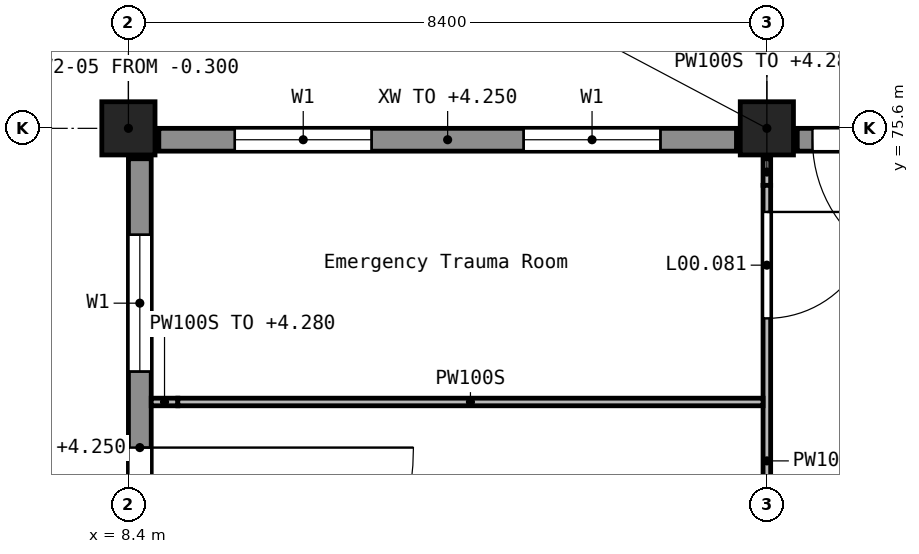
"""IFC4 building model, lengths in metres.
Left out: names, types, materials, properties, quantities, classifications, styles, units other than length and angle.
Written with IfcOpenShell. Run it as: python <this file> out.ifc"""

import sys

from ifc_helpers import new_model, si_unit, direction, frame, frame_2d, origin, origin_2d, place, context, subcontext, project, spatial, rectangle, extrude, element, fill, save


model = new_model("IFC4")
c1 = context("Model", 3, precision=1e-05, world=origin(), true_north=direction((0.0, 1.0)))
c2 = subcontext(c1, "Body", "Model", "MODEL_VIEW")
j1 = project(units=[si_unit("LENGTHUNIT", "METRE"), si_unit("PLANEANGLEUNIT", "RADIAN")], contexts=[c1])
p1 = place(None, origin())
s1 = spatial("IfcSite", under=j1, at=p1, CompositionType="ELEMENT")
p2 = place(p1, origin())
s2 = spatial("IfcBuilding", under=s1, at=p2, CompositionType="ELEMENT")
p3 = place(p2, origin())
s3 = spatial("IfcBuildingStorey", under=s2, at=p3, CompositionType="ELEMENT", Elevation=0.0)
for number, where, z_axis, x_axis in (
    (1, (8.4, 75.6, -0.3), (0.0, 0.0, 1.0), (1.0, 0.0, 0.0)),
    (2, (16.8, 75.6, -0.3), (0.0, 0.0, 1.0), (1.0, 0.0, 0.0)),
):
    element("IfcColumn", number, at=place(p3, frame(where, z_axis=z_axis, x_axis=x_axis)), inside=s3, PredefinedType="COLUMN", context=c2, shape_type="SweptSolid", body=[
        extrude(rectangle(XDim=0.7, YDim=0.7, at=origin_2d()), origin(), (0.0, 0.0, 1.0), 5.7),
    ])
p4 = place(p3, frame((24.8, 75.45, 0.0), z_axis=(0.0, 0.0, 1.0), x_axis=(-1.0, 0.0, 0.0)))
e3 = element("IfcWall", 3, at=p4, inside=s3, PredefinedType="STANDARD", context=c2, shape_type="SweptSolid", body=[
    extrude(rectangle(XDim=7.6, YDim=0.3, at=frame_2d((3.8, 0.0))), origin(), (0.0, 0.0, 1.0), 4.25),
])
p5 = place(p4, frame((5.6, 0.0, 0.0)))
e4 = element("IfcOpeningElement", 4, at=p5, cuts=e3, PredefinedType="OPENING", context=c2, shape_type="SweptSolid", body=[
    extrude(rectangle(XDim=1.8, YDim=2.1, at=frame_2d((0.9, 1.05))), frame((0.0, 0.16, 0.0), z_axis=(0.0, -1.0, 0.0), x_axis=(1.0, 0.0, 0.0)), (0.0, 0.0, 1.0), 0.32),
])
p6 = place(p4, frame((1.0, 0.0, 0.9)))
e5 = element("IfcOpeningElement", 5, at=p6, cuts=e3, PredefinedType="OPENING", context=c2, shape_type="SweptSolid", body=[
    extrude(rectangle(XDim=1.8, YDim=1.5, at=frame_2d((0.9, 0.75))), frame((0.0, 0.16, 0.0), z_axis=(0.0, -1.0, 0.0), x_axis=(1.0, 0.0, 0.0)), (0.0, 0.0, 1.0), 0.32),
])
p7 = place(p3, frame((16.4, 75.45, 0.0), z_axis=(0.0, 0.0, 1.0), x_axis=(-1.0, 0.0, 0.0)))
e6 = element("IfcWall", 6, at=p7, inside=s3, PredefinedType="STANDARD", context=c2, shape_type="SweptSolid", body=[
    extrude(rectangle(XDim=7.6, YDim=0.3, at=frame_2d((3.8, 0.0))), origin(), (0.0, 0.0, 1.0), 4.25),
])
p8 = place(p7, frame((1.0, 0.0, 0.9)))
e7 = element("IfcOpeningElement", 7, at=p8, cuts=e6, PredefinedType="OPENING", context=c2, shape_type="SweptSolid", body=[
    extrude(rectangle(XDim=1.8, YDim=1.5, at=frame_2d((0.9, 0.75))), frame((0.0, 0.16, 0.0), z_axis=(0.0, -1.0, 0.0), x_axis=(1.0, 0.0, 0.0)), (0.0, 0.0, 1.0), 0.32),
])
p9 = place(p7, frame((4.8, 0.0, 0.9)))
e8 = element("IfcOpeningElement", 8, at=p9, cuts=e6, PredefinedType="OPENING", context=c2, shape_type="SweptSolid", body=[
    extrude(rectangle(XDim=1.8, YDim=1.5, at=frame_2d((0.9, 0.75))), frame((0.0, 0.16, 0.0), z_axis=(0.0, -1.0, 0.0), x_axis=(1.0, 0.0, 0.0)), (0.0, 0.0, 1.0), 0.32),
])
p10 = place(p3, frame((8.55, 75.2, 0.0), z_axis=(0.0, 0.0, 1.0), x_axis=(0.0, -1.0, 0.0)))
e9 = element("IfcWall", 9, at=p10, inside=s3, PredefinedType="STANDARD", context=c2, shape_type="SweptSolid", body=[
    extrude(rectangle(XDim=7.6, YDim=0.3, at=frame_2d((3.8, 0.0))), origin(), (0.0, 0.0, 1.0), 4.25),
])
p11 = place(p10, frame((3.8, 0.0, 0.0)))
e10 = element("IfcOpeningElement", 10, at=p11, cuts=e9, PredefinedType="OPENING", context=c2, shape_type="SweptSolid", body=[
    extrude(rectangle(XDim=3.6, YDim=2.4, at=frame_2d((1.8, 1.2))), frame((0.0, 0.16, 0.0), z_axis=(0.0, -1.0, 0.0), x_axis=(1.0, 0.0, 0.0)), (0.0, 0.0, 1.0), 0.32),
])
p12 = place(p10, frame((1.0, 0.0, 0.9)))
e11 = element("IfcOpeningElement", 11, at=p12, cuts=e9, PredefinedType="OPENING", context=c2, shape_type="SweptSolid", body=[
    extrude(rectangle(XDim=1.8, YDim=1.5, at=frame_2d((0.9, 0.75))), frame((0.0, 0.16, 0.0), z_axis=(0.0, -1.0, 0.0), x_axis=(1.0, 0.0, 0.0)), (0.0, 0.0, 1.0), 0.32),
])
p13 = place(p3, frame((16.8, 75.2, 0.0), z_axis=(0.0, 0.0, 1.0), x_axis=(0.0, -1.0, 0.0)))
e12 = element("IfcWall", 12, at=p13, inside=s3, PredefinedType="PARTITIONING", context=c2, shape_type="SweptSolid", body=[
    extrude(rectangle(XDim=0.35, YDim=0.1, at=frame_2d((0.175, 0.0))), origin(), (0.0, 0.0, 1.0), 4.28),
])
p14 = place(p3, frame((16.8, 74.85, 0.0), z_axis=(0.0, 0.0, 1.0), x_axis=(0.0, -1.0, 0.0)))
e13 = element("IfcWall", 13, at=p14, inside=s3, PredefinedType="PARTITIONING", context=c2, shape_type="SweptSolid", body=[
    extrude(rectangle(XDim=7.25, YDim=0.1, at=frame_2d((3.625, 0.0))), origin(), (0.0, 0.0, 1.0), 5.05),
])
p15 = place(p14, frame((4.55, 0.0, 0.0)))
e14 = element("IfcOpeningElement", 14, at=p15, cuts=e13, PredefinedType="OPENING", context=c2, shape_type="SweptSolid", body=[
    extrude(rectangle(XDim=1.4, YDim=2.1, at=frame_2d((0.7, 1.05))), frame((0.0, 0.06, 0.0), z_axis=(0.0, -1.0, 0.0), x_axis=(1.0, 0.0, 0.0)), (0.0, 0.0, 1.0), 0.12),
])
p16 = place(p14, frame((0.35, 0.0, 0.0)))
e15 = element("IfcOpeningElement", 15, at=p16, cuts=e13, PredefinedType="OPENING", context=c2, shape_type="SweptSolid", body=[
    extrude(rectangle(XDim=1.4, YDim=2.1, at=frame_2d((0.7, 1.05))), frame((0.0, 0.06, 0.0), z_axis=(0.0, -1.0, 0.0), x_axis=(1.0, 0.0, 0.0)), (0.0, 0.0, 1.0), 0.12),
])
p17 = place(p3, frame((8.7, 72.0, 0.0), z_axis=(0.0, 0.0, 1.0), x_axis=(1.0, 0.0, 0.0)))
e16 = element("IfcWall", 16, at=p17, inside=s3, PredefinedType="PARTITIONING", context=c2, shape_type="SweptSolid", body=[
    extrude(rectangle(XDim=0.35, YDim=0.1, at=frame_2d((0.175, 0.0))), origin(), (0.0, 0.0, 1.0), 4.28),
])
p18 = place(p3, frame((9.05, 72.0, 0.0), z_axis=(0.0, 0.0, 1.0), x_axis=(1.0, 0.0, 0.0)))
e17 = element("IfcWall", 17, at=p18, inside=s3, PredefinedType="PARTITIONING", context=c2, shape_type="SweptSolid", body=[
    extrude(rectangle(XDim=7.7, YDim=0.1, at=frame_2d((3.85, 0.0))), origin(), (0.0, 0.0, 1.0), 5.05),
])
p19 = place(p11, frame((3.6, 0.0, 0.0), z_axis=(0.0, 0.0, 1.0), x_axis=(-1.0, 0.0, 0.0)))
e18 = element("IfcDoor", 18, at=p19, inside=s3, OperationType="SINGLE_SWING_LEFT", PredefinedType="DOOR", context=c2, shape_type="SweptSolid", body=[
    extrude(rectangle(XDim=3.6, YDim=2.4, at=frame_2d((1.8, 1.2))), frame((0.0, 0.025, 0.0), z_axis=(0.0, -1.0, 0.0), x_axis=(1.0, 0.0, 0.0)), (0.0, 0.0, 1.0), 0.05),
])
fill(e10, e18)
p20 = place(p5, frame((1.8, 0.0, 0.0), z_axis=(0.0, 0.0, 1.0), x_axis=(-1.0, 0.0, 0.0)))
e19 = element("IfcDoor", 19, at=p20, inside=s3, OperationType="SINGLE_SWING_LEFT", PredefinedType="DOOR", context=c2, shape_type="SweptSolid", body=[
    extrude(rectangle(XDim=1.8, YDim=2.1, at=frame_2d((0.9, 1.05))), frame((0.0, 0.025, 0.0), z_axis=(0.0, -1.0, 0.0), x_axis=(1.0, 0.0, 0.0)), (0.0, 0.0, 1.0), 0.05),
])
fill(e4, e19)
p21 = place(p8, origin())
e20 = element("IfcWindow", 20, at=p21, inside=s3, PartitioningType="SINGLE_PANEL", PredefinedType="WINDOW", context=c2, shape_type="SweptSolid", body=[
    extrude(rectangle(XDim=1.8, YDim=1.5, at=frame_2d((0.9, 0.75))), frame((0.0, 0.03, 0.0), z_axis=(0.0, -1.0, 0.0), x_axis=(1.0, 0.0, 0.0)), (0.0, 0.0, 1.0), 0.06),
])
fill(e7, e20)
p22 = place(p9, origin())
e21 = element("IfcWindow", 21, at=p22, inside=s3, PartitioningType="SINGLE_PANEL", PredefinedType="WINDOW", context=c2, shape_type="SweptSolid", body=[
    extrude(rectangle(XDim=1.8, YDim=1.5, at=frame_2d((0.9, 0.75))), frame((0.0, 0.03, 0.0), z_axis=(0.0, -1.0, 0.0), x_axis=(1.0, 0.0, 0.0)), (0.0, 0.0, 1.0), 0.06),
])
fill(e8, e21)
p23 = place(p12, origin())
e22 = element("IfcWindow", 22, at=p23, inside=s3, PartitioningType="SINGLE_PANEL", PredefinedType="WINDOW", context=c2, shape_type="SweptSolid", body=[
    extrude(rectangle(XDim=1.8, YDim=1.5, at=frame_2d((0.9, 0.75))), frame((0.0, 0.03, 0.0), z_axis=(0.0, -1.0, 0.0), x_axis=(1.0, 0.0, 0.0)), (0.0, 0.0, 1.0), 0.06),
])
fill(e11, e22)
p24 = place(p16, frame((1.4, 0.0, 0.0), z_axis=(0.0, 0.0, 1.0), x_axis=(-1.0, 0.0, 0.0)))
e23 = element("IfcDoor", 23, at=p24, inside=s3, OperationType="DOUBLE_DOOR_SINGLE_SWING", PredefinedType="DOOR", context=c2, shape_type="SweptSolid", body=[
    extrude(rectangle(XDim=1.4, YDim=2.1, at=frame_2d((0.7, 1.05))), frame((0.0, 0.025, 0.0), z_axis=(0.0, -1.0, 0.0), x_axis=(1.0, 0.0, 0.0)), (0.0, 0.0, 1.0), 0.05),
])
fill(e15, e23)
save(model, sys.argv[1])
